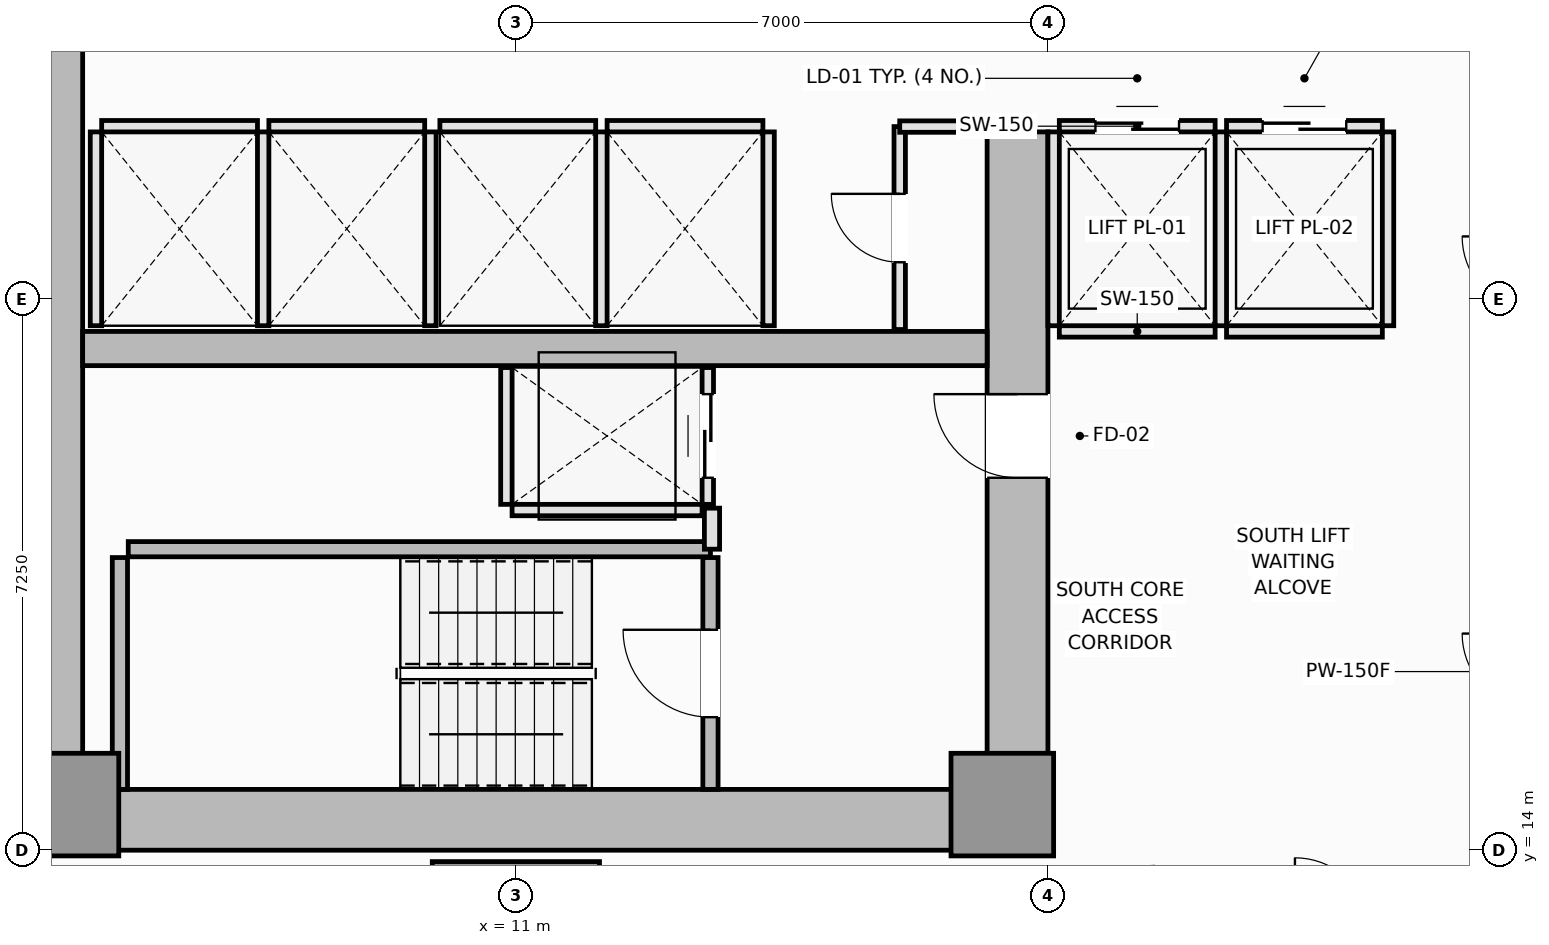
"""IFC4 building model, lengths in metres.
Left out: names, types, materials, properties, quantities, classifications, styles, units other than length and angle.
Written with IfcOpenShell. Run it as: python <this file> out.ifc"""

import sys

from ifc_helpers import new_model, si_unit, direction, frame, frame_2d, origin, origin_2d, place, context, subcontext, project, spatial, rectangle, extrude, element, fill, save


model = new_model("IFC4")
c1 = context("Model", 3, precision=1e-05, world=origin(), true_north=direction((0.0, 1.0)))
c2 = subcontext(c1, "Body", "Model", "MODEL_VIEW")
j1 = project(units=[si_unit("LENGTHUNIT", "METRE"), si_unit("PLANEANGLEUNIT", "RADIAN")], contexts=[c1])
p1 = place(None, origin())
s1 = spatial("IfcSite", under=j1, at=p1, CompositionType="ELEMENT")
p2 = place(p1, origin())
s2 = spatial("IfcBuilding", under=s1, at=p2, CompositionType="ELEMENT")
p3 = place(p2, frame((0.0, 0.0, 78.85)))
s3 = spatial("IfcBuildingStorey", under=s2, at=p3, CompositionType="ELEMENT", Elevation=78.85)
p4 = place(p3, frame((4.5, 14.4, 0.0), z_axis=(0.0, 0.0, 1.0), x_axis=(1.0, 0.0, 0.0)))
e1 = element("IfcWall", 1, at=p4, inside=s3, PredefinedType="SHEAR", context=c2, shape_type="SweptSolid", body=[
    extrude(rectangle(XDim=13.5, YDim=0.8, at=frame_2d((6.75, 0.0))), origin(), (0.0, 0.0, 1.0), 3.55),
])
p5 = place(p3, frame((4.9, 14.8, 0.0), z_axis=(0.0, 0.0, 1.0), x_axis=(0.0, 1.0, 0.0)))
e2 = element("IfcWall", 2, at=p5, inside=s3, PredefinedType="SHEAR", context=c2, shape_type="SweptSolid", body=[
    extrude(rectangle(XDim=20.9, YDim=0.8, at=frame_2d((10.45, 0.0))), origin(), (0.0, 0.0, 1.0), 3.55),
])
p6 = place(p3, frame((17.6, 14.8, 0.0), z_axis=(0.0, 0.0, 1.0), x_axis=(0.0, 1.0, 0.0)))
e3 = element("IfcWall", 3, at=p6, inside=s3, PredefinedType="SHEAR", context=c2, shape_type="SweptSolid", body=[
    extrude(rectangle(XDim=8.65, YDim=0.8, at=frame_2d((4.325, 0.0))), origin(), (0.0, 0.0, 1.0), 3.55),
])
p7 = place(p6, frame((4.1, 0.0, 0.0)))
e4 = element("IfcOpeningElement", 4, at=p7, cuts=e3, PredefinedType="OPENING", context=c2, shape_type="SweptSolid", body=[
    extrude(rectangle(XDim=1.1, YDim=2.15, at=frame_2d((0.55, 1.075))), frame((0.0, 0.41, 0.0), z_axis=(0.0, -1.0, 0.0), x_axis=(1.0, 0.0, 0.0)), (0.0, 0.0, 1.0), 0.82),
])
p8 = place(p3, frame((5.3, 20.6, 0.0), z_axis=(0.0, 0.0, 1.0), x_axis=(1.0, 0.0, 0.0)))
e5 = element("IfcWall", 5, at=p8, inside=s3, PredefinedType="SHEAR", context=c2, shape_type="SweptSolid", body=[
    extrude(rectangle(XDim=11.9, YDim=0.45, at=frame_2d((5.95, 0.0))), origin(), (0.0, 0.0, 1.0), 3.55),
])
for number, where, z_axis, x_axis in (
    (6, (5.1, 14.6, 0.0), (0.0, 0.0, 1.0), (1.0, 0.0, 0.0)),
    (7, (17.4, 14.6, 0.0), (0.0, 0.0, 1.0), (1.0, 0.0, 0.0)),
):
    element("IfcColumn", number, at=place(p3, frame(where, z_axis=z_axis, x_axis=x_axis)), inside=s3, PredefinedType="PILASTER", context=c2, shape_type="SweptSolid", body=[
        extrude(rectangle(XDim=1.35, YDim=1.35, at=origin_2d()), origin(), (0.0, 0.0, 1.0), 3.55),
    ])
p9 = place(p3, frame((11.0, 12.75, 0.0), z_axis=(0.0, 0.0, 1.0), x_axis=(1.0, 0.0, 0.0)))
e8 = element("IfcColumn", 8, at=p9, inside=s3, PredefinedType="COLUMN", context=c2, shape_type="SweptSolid", body=[
    extrude(rectangle(XDim=2.2, YDim=2.2, at=origin_2d()), origin(), (0.0, 0.0, 1.0), 3.55),
])
p10 = place(p3, frame((5.79, 14.8, 0.0), z_axis=(0.0, 0.0, 1.0), x_axis=(0.0, 1.0, 0.0)))
e9 = element("IfcWall", 9, at=p10, inside=s3, PredefinedType="SOLIDWALL", context=c2, shape_type="SweptSolid", body=[
    extrude(rectangle(XDim=3.05, YDim=0.2, at=frame_2d((1.525, 0.0))), origin(), (0.0, 0.0, 1.0), 3.55),
])
p11 = place(p3, frame((5.9, 17.96, 0.0), z_axis=(0.0, 0.0, 1.0), x_axis=(1.0, 0.0, 0.0)))
e10 = element("IfcWall", 10, at=p11, inside=s3, PredefinedType="SOLIDWALL", context=c2, shape_type="SweptSolid", body=[
    extrude(rectangle(XDim=7.66, YDim=0.2, at=frame_2d((3.83, 0.0))), origin(), (0.0, 0.0, 1.0), 3.55),
])
p12 = place(p3, frame((13.56, 14.8, 0.0), z_axis=(0.0, 0.0, 1.0), x_axis=(0.0, 1.0, 0.0)))
e11 = element("IfcWall", 11, at=p12, inside=s3, PredefinedType="SOLIDWALL", context=c2, shape_type="SweptSolid", body=[
    extrude(rectangle(XDim=3.05, YDim=0.2, at=frame_2d((1.525, 0.0))), origin(), (0.0, 0.0, 1.0), 3.55),
])
p13 = place(p12, frame((0.95, 0.0, 0.0)))
e12 = element("IfcOpeningElement", 12, at=p13, cuts=e11, PredefinedType="OPENING", context=c2, shape_type="SweptSolid", body=[
    extrude(rectangle(XDim=1.15, YDim=2.15, at=frame_2d((0.575, 1.075))), frame((0.0, 0.11, 0.0), z_axis=(0.0, -1.0, 0.0), x_axis=(1.0, 0.0, 0.0)), (0.0, 0.0, 1.0), 0.22),
])
p14 = place(p3, frame((18.15, 20.825, 0.0), z_axis=(0.0, 0.0, 1.0), x_axis=(1.0, 0.0, 0.0)))
e13 = element("IfcWall", 13, at=p14, inside=s3, PredefinedType="PARTITIONING", context=c2, shape_type="SweptSolid", body=[
    extrude(rectangle(XDim=2.05, YDim=0.15, at=frame_2d((1.025, 0.0))), origin(), (0.0, 0.0, 1.0), 3.37),
])
p15 = place(p3, frame((18.15, 23.525, 0.0), z_axis=(0.0, 0.0, 1.0), x_axis=(1.0, 0.0, 0.0)))
e14 = element("IfcWall", 14, at=p15, inside=s3, PredefinedType="PARTITIONING", context=c2, shape_type="SweptSolid", body=[
    extrude(rectangle(XDim=2.05, YDim=0.15, at=frame_2d((1.025, 0.0))), origin(), (0.0, 0.0, 1.0), 3.37),
])
p16 = place(p15, frame((0.475, 0.0, 0.0)))
e15 = element("IfcOpeningElement", 15, at=p16, cuts=e14, PredefinedType="OPENING", context=c2, shape_type="SweptSolid", body=[
    extrude(rectangle(XDim=1.1, YDim=2.2, at=frame_2d((0.55, 1.1))), frame((0.0, 0.085, 0.0), z_axis=(0.0, -1.0, 0.0), x_axis=(1.0, 0.0, 0.0)), (0.0, 0.0, 1.0), 0.17),
])
for number, where, z_axis, x_axis in (
    (16, (18.075, 20.9, 0.0), (0.0, 0.0, 1.0), (0.0, 1.0, 0.0)),
    (17, (20.275, 20.9, 0.0), (0.0, 0.0, 1.0), (0.0, 1.0, 0.0)),
):
    element("IfcWall", number, at=place(p3, frame(where, z_axis=z_axis, x_axis=x_axis)), inside=s3, PredefinedType="PARTITIONING", context=c2, shape_type="SweptSolid", body=[
        extrude(rectangle(XDim=2.55, YDim=0.15, at=frame_2d((1.275, 0.0))), origin(), (0.0, 0.0, 1.0), 3.37),
    ])
p17 = place(p3, frame((20.35, 20.825, 0.0), z_axis=(0.0, 0.0, 1.0), x_axis=(1.0, 0.0, 0.0)))
e18 = element("IfcWall", 18, at=p17, inside=s3, PredefinedType="PARTITIONING", context=c2, shape_type="SweptSolid", body=[
    extrude(rectangle(XDim=2.05, YDim=0.15, at=frame_2d((1.025, 0.0))), origin(), (0.0, 0.0, 1.0), 3.37),
])
p18 = place(p3, frame((20.35, 23.525, 0.0), z_axis=(0.0, 0.0, 1.0), x_axis=(1.0, 0.0, 0.0)))
e19 = element("IfcWall", 19, at=p18, inside=s3, PredefinedType="PARTITIONING", context=c2, shape_type="SweptSolid", body=[
    extrude(rectangle(XDim=2.05, YDim=0.15, at=frame_2d((1.025, 0.0))), origin(), (0.0, 0.0, 1.0), 3.37),
])
p19 = place(p18, frame((0.475, 0.0, 0.0)))
e20 = element("IfcOpeningElement", 20, at=p19, cuts=e19, PredefinedType="OPENING", context=c2, shape_type="SweptSolid", body=[
    extrude(rectangle(XDim=1.1, YDim=2.2, at=frame_2d((0.55, 1.1))), frame((0.0, 0.085, 0.0), z_axis=(0.0, -1.0, 0.0), x_axis=(1.0, 0.0, 0.0)), (0.0, 0.0, 1.0), 0.17),
])
p20 = place(p3, frame((22.475, 20.9, 0.0), z_axis=(0.0, 0.0, 1.0), x_axis=(0.0, 1.0, 0.0)))
e21 = element("IfcWall", 21, at=p20, inside=s3, PredefinedType="PARTITIONING", context=c2, shape_type="SweptSolid", body=[
    extrude(rectangle(XDim=2.55, YDim=0.15, at=frame_2d((1.275, 0.0))), origin(), (0.0, 0.0, 1.0), 3.37),
])
p21 = place(p3, frame((5.55, 23.525, 0.0), z_axis=(0.0, 0.0, 1.0), x_axis=(1.0, 0.0, 0.0)))
e22 = element("IfcWall", 22, at=p21, inside=s3, PredefinedType="PARTITIONING", context=c2, shape_type="SweptSolid", body=[
    extrude(rectangle(XDim=2.05, YDim=0.15, at=frame_2d((1.025, 0.0))), origin(), (0.0, 0.0, 1.0), 3.37),
])
for number, where, z_axis, x_axis in (
    (23, (5.475, 20.9, 0.0), (0.0, 0.0, 1.0), (0.0, 1.0, 0.0)),
    (24, (7.675, 20.9, 0.0), (0.0, 0.0, 1.0), (0.0, 1.0, 0.0)),
):
    element("IfcWall", number, at=place(p3, frame(where, z_axis=z_axis, x_axis=x_axis)), inside=s3, PredefinedType="PARTITIONING", context=c2, shape_type="SweptSolid", body=[
        extrude(rectangle(XDim=2.55, YDim=0.15, at=frame_2d((1.275, 0.0))), origin(), (0.0, 0.0, 1.0), 3.37),
    ])
p22 = place(p3, frame((7.75, 23.525, 0.0), z_axis=(0.0, 0.0, 1.0), x_axis=(1.0, 0.0, 0.0)))
e25 = element("IfcWall", 25, at=p22, inside=s3, PredefinedType="PARTITIONING", context=c2, shape_type="SweptSolid", body=[
    extrude(rectangle(XDim=2.05, YDim=0.15, at=frame_2d((1.025, 0.0))), origin(), (0.0, 0.0, 1.0), 3.37),
])
p23 = place(p3, frame((9.875, 20.9, 0.0), z_axis=(0.0, 0.0, 1.0), x_axis=(0.0, 1.0, 0.0)))
e26 = element("IfcWall", 26, at=p23, inside=s3, PredefinedType="PARTITIONING", context=c2, shape_type="SweptSolid", body=[
    extrude(rectangle(XDim=2.55, YDim=0.15, at=frame_2d((1.275, 0.0))), origin(), (0.0, 0.0, 1.0), 3.37),
])
p24 = place(p3, frame((10.0, 23.525, 0.0), z_axis=(0.0, 0.0, 1.0), x_axis=(1.0, 0.0, 0.0)))
e27 = element("IfcWall", 27, at=p24, inside=s3, PredefinedType="PARTITIONING", context=c2, shape_type="SweptSolid", body=[
    extrude(rectangle(XDim=2.05, YDim=0.15, at=frame_2d((1.025, 0.0))), origin(), (0.0, 0.0, 1.0), 3.37),
])
p25 = place(p3, frame((12.125, 20.9, 0.0), z_axis=(0.0, 0.0, 1.0), x_axis=(0.0, 1.0, 0.0)))
e28 = element("IfcWall", 28, at=p25, inside=s3, PredefinedType="PARTITIONING", context=c2, shape_type="SweptSolid", body=[
    extrude(rectangle(XDim=2.55, YDim=0.15, at=frame_2d((1.275, 0.0))), origin(), (0.0, 0.0, 1.0), 3.37),
])
p26 = place(p3, frame((12.2, 23.525, 0.0), z_axis=(0.0, 0.0, 1.0), x_axis=(1.0, 0.0, 0.0)))
e29 = element("IfcWall", 29, at=p26, inside=s3, PredefinedType="PARTITIONING", context=c2, shape_type="SweptSolid", body=[
    extrude(rectangle(XDim=2.05, YDim=0.15, at=frame_2d((1.025, 0.0))), origin(), (0.0, 0.0, 1.0), 3.37),
])
p27 = place(p3, frame((14.325, 20.9, 0.0), z_axis=(0.0, 0.0, 1.0), x_axis=(0.0, 1.0, 0.0)))
e30 = element("IfcWall", 30, at=p27, inside=s3, PredefinedType="PARTITIONING", context=c2, shape_type="SweptSolid", body=[
    extrude(rectangle(XDim=2.55, YDim=0.15, at=frame_2d((1.275, 0.0))), origin(), (0.0, 0.0, 1.0), 3.37),
])
p28 = place(p3, frame((10.95, 18.475, 0.0), z_axis=(0.0, 0.0, 1.0), x_axis=(1.0, 0.0, 0.0)))
e31 = element("IfcWall", 31, at=p28, inside=s3, PredefinedType="PARTITIONING", context=c2, shape_type="SweptSolid", body=[
    extrude(rectangle(XDim=2.5, YDim=0.15, at=frame_2d((1.25, 0.0))), origin(), (0.0, 0.0, 1.0), 3.37),
])
p29 = place(p3, frame((10.875, 18.55, 0.0), z_axis=(0.0, 0.0, 1.0), x_axis=(0.0, 1.0, 0.0)))
e32 = element("IfcWall", 32, at=p29, inside=s3, PredefinedType="PARTITIONING", context=c2, shape_type="SweptSolid", body=[
    extrude(rectangle(XDim=1.8, YDim=0.15, at=frame_2d((0.9, 0.0))), origin(), (0.0, 0.0, 1.0), 3.37),
])
p30 = place(p3, frame((13.525, 18.55, 0.0), z_axis=(0.0, 0.0, 1.0), x_axis=(0.0, 1.0, 0.0)))
e33 = element("IfcWall", 33, at=p30, inside=s3, PredefinedType="PARTITIONING", context=c2, shape_type="SweptSolid", body=[
    extrude(rectangle(XDim=1.8, YDim=0.15, at=frame_2d((0.9, 0.0))), origin(), (0.0, 0.0, 1.0), 3.37),
])
p31 = place(p30, frame((0.35, 0.0, 0.0)))
e34 = element("IfcOpeningElement", 34, at=p31, cuts=e33, PredefinedType="OPENING", context=c2, shape_type="SweptSolid", body=[
    extrude(rectangle(XDim=1.1, YDim=2.2, at=frame_2d((0.55, 1.1))), frame((0.0, 0.085, 0.0), z_axis=(0.0, -1.0, 0.0), x_axis=(1.0, 0.0, 0.0)), (0.0, 0.0, 1.0), 0.17),
])
p32 = place(p3, frame((13.58, 17.96, 0.0), z_axis=(0.0, 0.0, 1.0), x_axis=(0.0, 1.0, 0.0)))
e35 = element("IfcWall", 35, at=p32, inside=s3, PredefinedType="PARTITIONING", context=c2, shape_type="SweptSolid", body=[
    extrude(rectangle(XDim=0.54, YDim=0.2, at=frame_2d((0.27, 0.0))), origin(), (0.0, 0.0, 1.0), 3.37),
])
p33 = place(p3, frame((16.05, 20.85, 0.0), z_axis=(0.0, 0.0, 1.0), x_axis=(0.0, 1.0, 0.0)))
e36 = element("IfcWall", 36, at=p33, inside=s3, PredefinedType="PARTITIONING", context=c2, shape_type="SweptSolid", body=[
    extrude(rectangle(XDim=2.67, YDim=0.15, at=frame_2d((1.335, 0.0))), origin(), (0.0, 0.0, 1.0), 3.37),
])
p34 = place(p33, frame((0.885, 0.0, 0.0)))
e37 = element("IfcOpeningElement", 37, at=p34, cuts=e36, PredefinedType="OPENING", context=c2, shape_type="SweptSolid", body=[
    extrude(rectangle(XDim=0.9, YDim=2.1, at=frame_2d((0.45, 1.05))), frame((0.0, 0.085, 0.0), z_axis=(0.0, -1.0, 0.0), x_axis=(1.0, 0.0, 0.0)), (0.0, 0.0, 1.0), 0.17),
])
p35 = place(p3, frame((16.05, 23.52, 0.0), z_axis=(0.0, 0.0, 1.0), x_axis=(1.0, 0.0, 0.0)))
e38 = element("IfcWall", 38, at=p35, inside=s3, PredefinedType="PARTITIONING", context=c2, shape_type="SweptSolid", body=[
    extrude(rectangle(XDim=1.17, YDim=0.15, at=frame_2d((0.585, 0.0))), origin(), (0.0, 0.0, 1.0), 3.37),
])
p36 = place(p13, origin())
e39 = element("IfcDoor", 39, at=p36, inside=s3, OperationType="SINGLE_SWING_RIGHT", PredefinedType="DOOR", context=c2, shape_type="SweptSolid", body=[
    extrude(rectangle(XDim=1.15, YDim=2.15, at=frame_2d((0.575, 1.075))), frame((0.0, 0.025, 0.0), z_axis=(0.0, -1.0, 0.0), x_axis=(1.0, 0.0, 0.0)), (0.0, 0.0, 1.0), 0.05),
])
fill(e12, e39)
p37 = place(p16, origin())
e40 = element("IfcDoor", 40, at=p37, inside=s3, OperationType="DOUBLE_DOOR_SLIDING", PredefinedType="DOOR", context=c2, shape_type="SweptSolid", body=[
    extrude(rectangle(XDim=1.1, YDim=2.2, at=frame_2d((0.55, 1.1))), frame((0.0, 0.025, 0.0), z_axis=(0.0, -1.0, 0.0), x_axis=(1.0, 0.0, 0.0)), (0.0, 0.0, 1.0), 0.05),
])
fill(e15, e40)
p38 = place(p19, origin())
e41 = element("IfcDoor", 41, at=p38, inside=s3, OperationType="DOUBLE_DOOR_SLIDING", PredefinedType="DOOR", context=c2, shape_type="SweptSolid", body=[
    extrude(rectangle(XDim=1.1, YDim=2.2, at=frame_2d((0.55, 1.1))), frame((0.0, 0.025, 0.0), z_axis=(0.0, -1.0, 0.0), x_axis=(1.0, 0.0, 0.0)), (0.0, 0.0, 1.0), 0.05),
])
fill(e20, e41)
p39 = place(p31, origin())
e42 = element("IfcDoor", 42, at=p39, inside=s3, OperationType="DOUBLE_DOOR_SLIDING", PredefinedType="DOOR", context=c2, shape_type="SweptSolid", body=[
    extrude(rectangle(XDim=1.1, YDim=2.2, at=frame_2d((0.55, 1.1))), frame((0.0, 0.025, 0.0), z_axis=(0.0, -1.0, 0.0), x_axis=(1.0, 0.0, 0.0)), (0.0, 0.0, 1.0), 0.05),
])
fill(e34, e42)
p40 = place(p7, origin())
e43 = element("IfcDoor", 43, at=p40, inside=s3, OperationType="SINGLE_SWING_RIGHT", PredefinedType="DOOR", context=c2, shape_type="SweptSolid", body=[
    extrude(rectangle(XDim=1.1, YDim=2.15, at=frame_2d((0.55, 1.075))), frame((0.0, 0.025, 0.0), z_axis=(0.0, -1.0, 0.0), x_axis=(1.0, 0.0, 0.0)), (0.0, 0.0, 1.0), 0.05),
])
fill(e4, e43)
p41 = place(p34, origin())
e44 = element("IfcDoor", 44, at=p41, inside=s3, OperationType="SINGLE_SWING_RIGHT", PredefinedType="DOOR", context=c2, shape_type="SweptSolid", body=[
    extrude(rectangle(XDim=0.9, YDim=2.1, at=frame_2d((0.45, 1.05))), frame((0.0, 0.025, 0.0), z_axis=(0.0, -1.0, 0.0), x_axis=(1.0, 0.0, 0.0)), (0.0, 0.0, 1.0), 0.05),
])
fill(e37, e44)
save(model, sys.argv[1])
